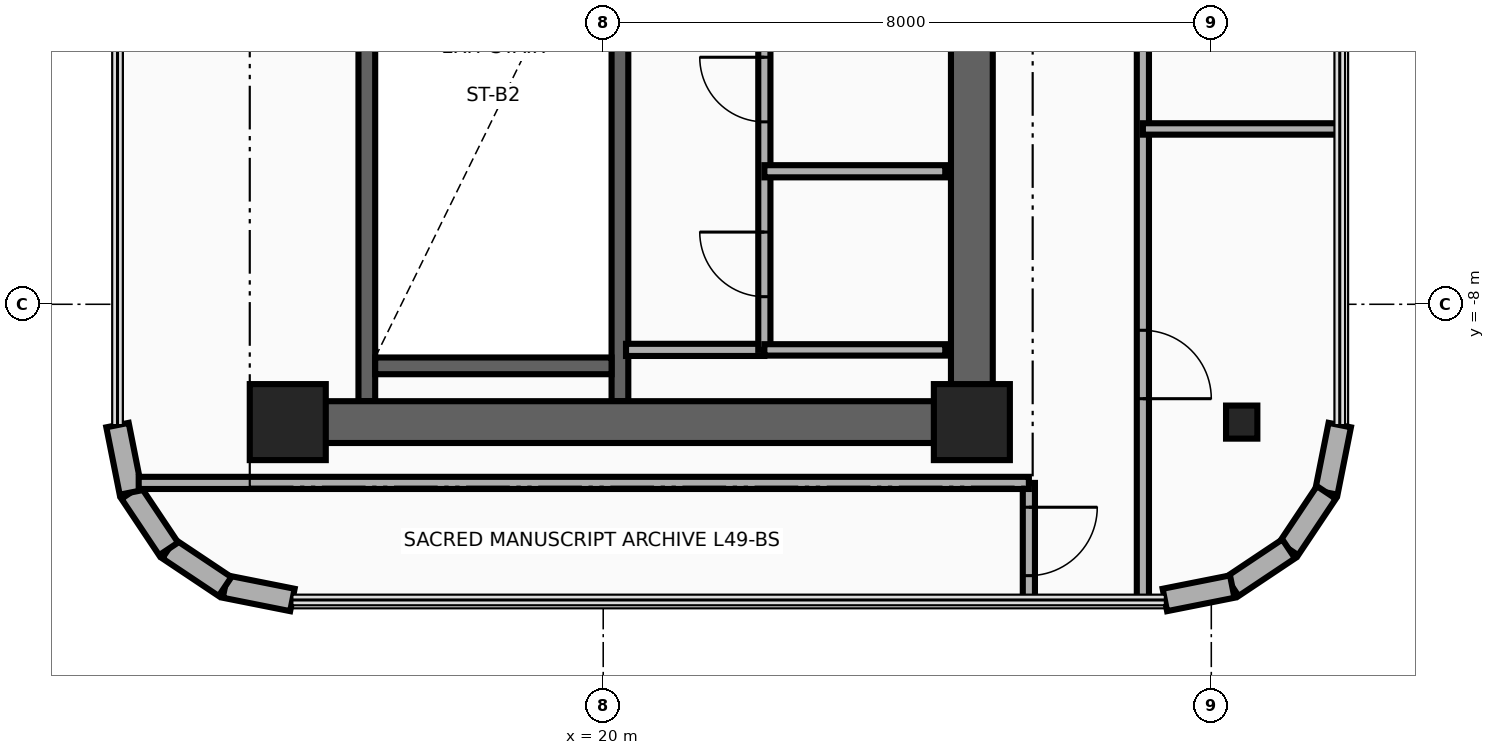
"""IFC4 building model, lengths in metres.
Left out: names, types, materials, properties, quantities, classifications, styles, units other than length and angle.
Written with IfcOpenShell. Run it as: python <this file> out.ifc"""

import sys

from ifc_helpers import new_model, si_unit, direction, frame, frame_2d, origin, origin_2d, place, context, subcontext, project, spatial, rectangle, i_section, extrude, source, transform, mapped, element, fill, save


model = new_model("IFC4")
c1 = context("Model", 3, precision=1e-05, world=origin(), true_north=direction((0.0, 1.0)))
c2 = subcontext(c1, "Body", "Model", "MODEL_VIEW")
j1 = project(units=[si_unit("LENGTHUNIT", "METRE"), si_unit("PLANEANGLEUNIT", "RADIAN")], contexts=[c1])
p1 = place(None, origin())
s1 = spatial("IfcSite", under=j1, at=p1, CompositionType="ELEMENT")
p2 = place(p1, origin())
s2 = spatial("IfcBuilding", under=s1, at=p2, CompositionType="ELEMENT")
p3 = place(p2, frame((0.0, 0.0, 192.35)))
s3 = spatial("IfcBuildingStorey", under=s2, at=p3, CompositionType="ELEMENT", Elevation=192.35)
for number, where, z_axis, x_axis in (
    (1, (16.89, -9.275, 0.0), (0.0, 0.0, 1.0), (0.0, 1.0, 0.0)),
    (2, (20.22, -9.275, 0.0), (0.0, 0.0, 1.0), (0.0, 1.0, 0.0)),
):
    element("IfcWall", number, at=place(p3, frame(where, z_axis=z_axis, x_axis=x_axis)), inside=s3, PredefinedType="SHEAR", context=c2, shape_type="SweptSolid", body=[
        extrude(rectangle(XDim=8.595, YDim=0.22, at=frame_2d((4.297, 0.0))), origin(), (0.0, 0.0, 1.0), 3.71),
    ])
p4 = place(p3, frame((17.0, -8.81, 0.0), z_axis=(0.0, 0.0, 1.0), x_axis=(1.0, 0.0, 0.0)))
e3 = element("IfcWall", 3, at=p4, inside=s3, PredefinedType="SHEAR", context=c2, shape_type="SweptSolid", body=[
    extrude(rectangle(XDim=3.11, YDim=0.22, at=frame_2d((1.555, 0.0))), origin(), (0.0, 0.0, 1.0), 3.71),
])
p5 = place(p3, frame((24.85, -9.825, 0.0), z_axis=(0.0, 0.0, 1.0), x_axis=(0.0, 1.0, 0.0)))
e4 = element("IfcWall", 4, at=p5, inside=s3, PredefinedType="SHEAR", context=c2, shape_type="SweptSolid", body=[
    extrude(rectangle(XDim=8.875, YDim=0.55, at=frame_2d((4.438, 0.0))), origin(), (0.0, 0.0, 1.0), 3.71),
])
p6 = place(p3, frame((15.85, -9.55, 0.0), z_axis=(0.0, 0.0, 1.0), x_axis=(1.0, 0.0, 0.0)))
e5 = element("IfcWall", 5, at=p6, inside=s3, PredefinedType="SHEAR", context=c2, shape_type="SweptSolid", body=[
    extrude(rectangle(XDim=9.0, YDim=0.55, at=frame_2d((4.5, 0.0))), origin(), (0.0, 0.0, 1.0), 3.71),
])
m1 = source(origin(), c2, "Body", "SweptSolid", [
    extrude(rectangle(XDim=1.0, YDim=1.0, at=origin_2d()), origin(), (0.0, 0.0, 1.0), 3.95),
])
for number, where, z_axis, x_axis in (
    (6, (15.85, -9.55, 0.0), (0.0, 0.0, 1.0), (1.0, 0.0, 0.0)),
    (7, (24.85, -9.55, 0.0), (0.0, 0.0, 1.0), (1.0, 0.0, 0.0)),
):
    element("IfcColumn", number, at=place(p3, frame(where, z_axis=z_axis, x_axis=x_axis)), inside=s3, PredefinedType="COLUMN", context=c2, shape_type="MappedRepresentation", body=[
        mapped(m1, transform((0.0, 0.0, 0.0), x_axis=(1.0, 0.0, 0.0), y_axis=(0.0, 1.0, 0.0), z_axis=(0.0, 0.0, 1.0), scale=1.0)),
    ])
m2 = source(origin(), c2, "Body", "SweptSolid", [
    extrude(i_section(OverallWidth=0.412, OverallDepth=0.435, WebThickness=0.036, FlangeThickness=0.057, at=origin_2d()), origin(), (0.0, 0.0, 1.0), 3.95),
])
p7 = place(p3, frame((28.4, -9.55, 0.0), z_axis=(0.0, 0.0, 1.0), x_axis=(1.0, 0.0, 0.0)))
e8 = element("IfcColumn", 8, at=p7, inside=s3, PredefinedType="COLUMN", context=c2, shape_type="MappedRepresentation", body=[
    mapped(m2, transform((0.0, 0.0, 0.0), x_axis=(1.0, 0.0, 0.0), y_axis=(0.0, 1.0, 0.0), z_axis=(0.0, 0.0, 1.0), scale=1.0)),
])
p8 = place(p3, frame((29.69, -9.589, 0.0), z_axis=(0.0, 0.0, 1.0), x_axis=(-0.195025152871, -0.980798241101, 0.0)))
e9 = element("IfcWall", 9, at=p8, inside=s3, PredefinedType="SOLIDWALL", context=c2, shape_type="SweptSolid", body=[
    extrude(rectangle(XDim=0.904, YDim=0.3, at=frame_2d((0.452, 0.0))), origin(), (0.0, 0.0, 1.0), 3.71),
])
p9 = place(p3, frame((29.514, -10.476, 0.0), z_axis=(0.0, 0.0, 1.0), x_axis=(-0.555520488502, -0.831502848374, 0.0)))
e10 = element("IfcWall", 10, at=p9, inside=s3, PredefinedType="SOLIDWALL", context=c2, shape_type="SweptSolid", body=[
    extrude(rectangle(XDim=0.893, YDim=0.3, at=frame_2d((0.446, 0.0))), origin(), (0.0, 0.0, 1.0), 3.71),
])
p10 = place(p3, frame((29.018, -11.218, 0.0), z_axis=(0.0, 0.0, 1.0), x_axis=(-0.83158722889, -0.555394167009, 0.0)))
e11 = element("IfcWall", 11, at=p10, inside=s3, PredefinedType="SOLIDWALL", context=c2, shape_type="SweptSolid", body=[
    extrude(rectangle(XDim=0.893, YDim=0.3, at=frame_2d((0.446, 0.0))), origin(), (0.0, 0.0, 1.0), 3.71),
])
p11 = place(p3, frame((28.275, -11.714, 0.0), z_axis=(0.0, 0.0, 1.0), x_axis=(-0.980787963133, -0.19507683454, 0.0)))
e12 = element("IfcWall", 12, at=p11, inside=s3, PredefinedType="SOLIDWALL", context=c2, shape_type="SweptSolid", body=[
    extrude(rectangle(XDim=0.904, YDim=0.3, at=frame_2d((0.452, 0.0))), origin(), (0.0, 0.0, 1.0), 3.71),
])
p12 = place(p3, frame((15.911, -11.89, 0.0), z_axis=(0.0, 0.0, 1.0), x_axis=(-0.980798241101, 0.195025152871, 0.0)))
e13 = element("IfcWall", 13, at=p12, inside=s3, PredefinedType="SOLIDWALL", context=c2, shape_type="SweptSolid", body=[
    extrude(rectangle(XDim=0.904, YDim=0.3, at=frame_2d((0.452, 0.0))), origin(), (0.0, 0.0, 1.0), 3.71),
])
for number, where, z_axis, x_axis in (
    (14, (15.024, -11.714, 0.0), (0.0, 0.0, 1.0), (-0.832, 0.556, 0.0)),
    (15, (14.282, -11.218, 0.0), (0.0, 0.0, 1.0), (-0.556, 0.832, 0.0)),
):
    element("IfcWall", number, at=place(p3, frame(where, z_axis=z_axis, x_axis=x_axis)), inside=s3, PredefinedType="SOLIDWALL", context=c2, shape_type="SweptSolid", body=[
        extrude(rectangle(XDim=0.893, YDim=0.3, at=frame_2d((0.446, 0.0))), origin(), (0.0, 0.0, 1.0), 3.71),
    ])
p13 = place(p3, frame((13.786, -10.476, 0.0), z_axis=(0.0, 0.0, 1.0), x_axis=(-0.195025152871, 0.980798241101, 0.0)))
e16 = element("IfcWall", 16, at=p13, inside=s3, PredefinedType="SOLIDWALL", context=c2, shape_type="SweptSolid", body=[
    extrude(rectangle(XDim=0.904, YDim=0.3, at=frame_2d((0.452, 0.0))), origin(), (0.0, 0.0, 1.0), 3.71),
])
p14 = place(p3, frame((20.3, -8.6, 0.0), z_axis=(0.0, 0.0, 1.0), x_axis=(1.0, 0.0, 0.0)))
e17 = element("IfcWall", 17, at=p14, inside=s3, PredefinedType="PARTITIONING", context=c2, shape_type="SweptSolid", body=[
    extrude(rectangle(XDim=1.82, YDim=0.16, at=frame_2d((0.91, 0.0))), origin(), (0.0, 0.0, 1.0), 3.71),
])
p15 = place(p3, frame((22.12, -8.6, 0.0), z_axis=(0.0, 0.0, 1.0), x_axis=(0.0, 1.0, 0.0)))
e18 = element("IfcWall", 18, at=p15, inside=s3, PredefinedType="PARTITIONING", context=c2, shape_type="SweptSolid", body=[
    extrude(rectangle(XDim=4.65, YDim=0.16, at=frame_2d((2.325, 0.0))), origin(), (0.0, 0.0, 1.0), 3.71),
])
p16 = place(p15, frame((0.7, 0.0, 0.0)))
e19 = element("IfcOpeningElement", 19, at=p16, cuts=e18, PredefinedType="OPENING", context=c2, shape_type="SweptSolid", body=[
    extrude(rectangle(XDim=0.85, YDim=2.05, at=frame_2d((0.425, 1.025))), frame((0.0, 0.095, 0.0), z_axis=(0.0, -1.0, 0.0), x_axis=(1.0, 0.0, 0.0)), (0.0, 0.0, 1.0), 0.19),
])
p17 = place(p15, frame((3.0, 0.0, 0.0)))
e20 = element("IfcOpeningElement", 20, at=p17, cuts=e18, PredefinedType="OPENING", context=c2, shape_type="SweptSolid", body=[
    extrude(rectangle(XDim=0.85, YDim=2.05, at=frame_2d((0.425, 1.025))), frame((0.0, 0.095, 0.0), z_axis=(0.0, -1.0, 0.0), x_axis=(1.0, 0.0, 0.0)), (0.0, 0.0, 1.0), 0.19),
])
p18 = place(p3, frame((22.12, -8.6, 0.0), z_axis=(0.0, 0.0, 1.0), x_axis=(1.0, 0.0, 0.0)))
e21 = element("IfcWall", 21, at=p18, inside=s3, PredefinedType="PARTITIONING", context=c2, shape_type="SweptSolid", body=[
    extrude(rectangle(XDim=2.38, YDim=0.15, at=frame_2d((1.19, 0.0))), origin(), (0.0, 0.0, 1.0), 3.71),
])
p19 = place(p3, frame((22.12, -6.25, 0.0), z_axis=(0.0, 0.0, 1.0), x_axis=(1.0, 0.0, 0.0)))
e22 = element("IfcWall", 22, at=p19, inside=s3, PredefinedType="PARTITIONING", context=c2, shape_type="SweptSolid", body=[
    extrude(rectangle(XDim=2.38, YDim=0.16, at=frame_2d((1.19, 0.0))), origin(), (0.0, 0.0, 1.0), 3.71),
])
p20 = place(p3, frame((25.6, -11.89, 0.0), z_axis=(0.0, 0.0, 1.0), x_axis=(0.0, 1.0, 0.0)))
e23 = element("IfcWall", 23, at=p20, inside=s3, PredefinedType="PARTITIONING", context=c2, shape_type="SweptSolid", body=[
    extrude(rectangle(XDim=1.54, YDim=0.16, at=frame_2d((0.77, 0.0))), origin(), (0.0, 0.0, 1.0), 3.71),
])
p21 = place(p20, frame((0.32, 0.0, 0.0)))
e24 = element("IfcOpeningElement", 24, at=p21, cuts=e23, PredefinedType="OPENING", context=c2, shape_type="SweptSolid", body=[
    extrude(rectangle(XDim=0.9, YDim=2.1, at=frame_2d((0.45, 1.05))), frame((0.0, 0.095, 0.0), z_axis=(0.0, -1.0, 0.0), x_axis=(1.0, 0.0, 0.0)), (0.0, 0.0, 1.0), 0.19),
])
p22 = place(p3, frame((13.889, -10.35, 0.0), z_axis=(0.0, 0.0, 1.0), x_axis=(1.0, 0.0, 0.0)))
e25 = element("IfcWall", 25, at=p22, inside=s3, PredefinedType="PARTITIONING", context=c2, shape_type="SweptSolid", body=[
    extrude(rectangle(XDim=11.711, YDim=0.16, at=frame_2d((5.855, 0.0))), origin(), (0.0, 0.0, 1.0), 3.71),
])
p23 = place(p3, frame((27.1, -11.89, 0.0), z_axis=(0.0, 0.0, 1.0), x_axis=(0.0, 1.0, 0.0)))
e26 = element("IfcWall", 26, at=p23, inside=s3, PredefinedType="PARTITIONING", context=c2, shape_type="SweptSolid", body=[
    extrude(rectangle(XDim=24.81, YDim=0.16, at=frame_2d((12.405, 0.0))), origin(), (0.0, 0.0, 1.0), 2.994),
])
p24 = place(p23, frame((2.648, 0.0, 0.0)))
e27 = element("IfcOpeningElement", 27, at=p24, cuts=e26, PredefinedType="OPENING", context=c2, shape_type="SweptSolid", body=[
    extrude(rectangle(XDim=0.9, YDim=2.1, at=frame_2d((0.45, 1.05))), frame((0.0, 0.095, 0.0), z_axis=(0.0, -1.0, 0.0), x_axis=(1.0, 0.0, 0.0)), (0.0, 0.0, 1.0), 0.19),
])
p25 = place(p23, frame((10.4, 0.0, 0.0)))
e28 = element("IfcOpeningElement", 28, at=p25, cuts=e26, PredefinedType="OPENING", context=c2, shape_type="SweptSolid", body=[
    extrude(rectangle(XDim=0.9, YDim=2.1, at=frame_2d((0.45, 1.05))), frame((0.0, 0.095, 0.0), z_axis=(0.0, -1.0, 0.0), x_axis=(1.0, 0.0, 0.0)), (0.0, 0.0, 1.0), 0.19),
])
p26 = place(p23, frame((19.707, 0.0, 0.0)))
e29 = element("IfcOpeningElement", 29, at=p26, cuts=e26, PredefinedType="OPENING", context=c2, shape_type="SweptSolid", body=[
    extrude(rectangle(XDim=0.9, YDim=2.1, at=frame_2d((0.45, 1.05))), frame((0.0, 0.095, 0.0), z_axis=(0.0, -1.0, 0.0), x_axis=(1.0, 0.0, 0.0)), (0.0, 0.0, 1.0), 0.19),
])
p27 = place(p3, frame((27.1, -5.693, 0.0), z_axis=(0.0, 0.0, 1.0), x_axis=(1.0, 0.0, 0.0)))
e30 = element("IfcWall", 30, at=p27, inside=s3, PredefinedType="PARTITIONING", context=c2, shape_type="SweptSolid", body=[
    extrude(rectangle(XDim=2.59, YDim=0.15, at=frame_2d((1.295, 0.0))), origin(), (0.0, 0.0, 1.0), 3.156),
])
p28 = place(p16, origin())
e31 = element("IfcDoor", 31, at=p28, inside=s3, OperationType="SINGLE_SWING_LEFT", PredefinedType="DOOR", context=c2, shape_type="SweptSolid", body=[
    extrude(rectangle(XDim=0.85, YDim=2.05, at=frame_2d((0.425, 1.025))), frame((0.0, 0.025, 0.0), z_axis=(0.0, -1.0, 0.0), x_axis=(1.0, 0.0, 0.0)), (0.0, 0.0, 1.0), 0.05),
])
fill(e19, e31)
p29 = place(p17, origin())
e32 = element("IfcDoor", 32, at=p29, inside=s3, OperationType="SINGLE_SWING_RIGHT", PredefinedType="DOOR", context=c2, shape_type="SweptSolid", body=[
    extrude(rectangle(XDim=0.85, YDim=2.05, at=frame_2d((0.425, 1.025))), frame((0.0, 0.025, 0.0), z_axis=(0.0, -1.0, 0.0), x_axis=(1.0, 0.0, 0.0)), (0.0, 0.0, 1.0), 0.05),
])
fill(e20, e32)
p30 = place(p21, frame((0.9, 0.0, 0.0), z_axis=(0.0, 0.0, 1.0), x_axis=(-1.0, 0.0, 0.0)))
e33 = element("IfcDoor", 33, at=p30, inside=s3, OperationType="SINGLE_SWING_LEFT", PredefinedType="DOOR", context=c2, shape_type="SweptSolid", body=[
    extrude(rectangle(XDim=0.9, YDim=2.1, at=frame_2d((0.45, 1.05))), frame((0.0, 0.025, 0.0), z_axis=(0.0, -1.0, 0.0), x_axis=(1.0, 0.0, 0.0)), (0.0, 0.0, 1.0), 0.05),
])
fill(e24, e33)
p31 = place(p24, frame((0.9, 0.0, 0.0), z_axis=(0.0, 0.0, 1.0), x_axis=(-1.0, 0.0, 0.0)))
e34 = element("IfcDoor", 34, at=p31, inside=s3, OperationType="SINGLE_SWING_LEFT", PredefinedType="DOOR", context=c2, shape_type="SweptSolid", body=[
    extrude(rectangle(XDim=0.9, YDim=2.1, at=frame_2d((0.45, 1.05))), frame((0.0, 0.025, 0.0), z_axis=(0.0, -1.0, 0.0), x_axis=(1.0, 0.0, 0.0)), (0.0, 0.0, 1.0), 0.05),
])
fill(e27, e34)
save(model, sys.argv[1])
